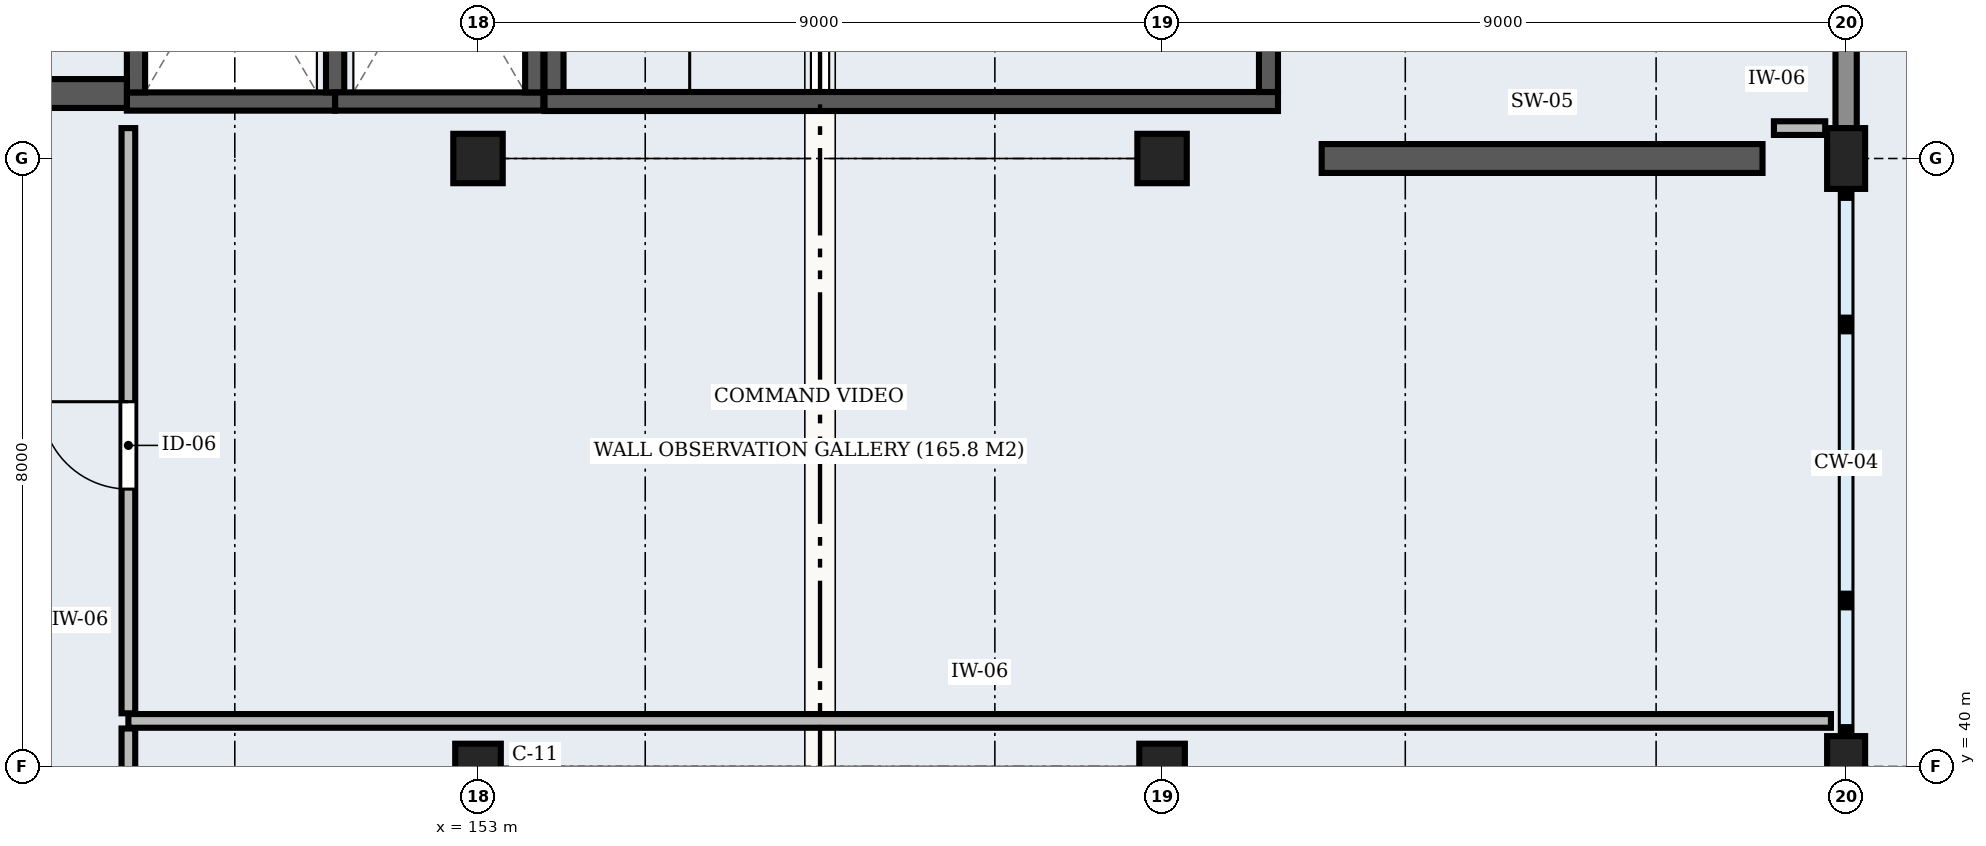
"""IFC4 building model, lengths in metres.
Left out: names, types, materials, properties, quantities, classifications, styles, units other than length and angle.
Written with IfcOpenShell. Run it as: python <this file> out.ifc"""

import sys

from ifc_helpers import new_model, si_unit, direction, frame, frame_2d, origin, origin_2d, place, context, subcontext, project, spatial, rectangle, extrude, element, fill, save


model = new_model("IFC4")
c1 = context("Model", 3, precision=1e-05, world=origin(), true_north=direction((0.0, 1.0)))
c2 = subcontext(c1, "Body", "Model", "MODEL_VIEW")
j1 = project(units=[si_unit("LENGTHUNIT", "METRE"), si_unit("PLANEANGLEUNIT", "RADIAN")], contexts=[c1])
p1 = place(None, origin())
s1 = spatial("IfcSite", under=j1, at=p1, CompositionType="ELEMENT")
p2 = place(p1, origin())
s2 = spatial("IfcBuilding", under=s1, at=p2, CompositionType="ELEMENT")
p3 = place(p2, frame((0.0, 0.0, 22.8)))
s3 = spatial("IfcBuildingStorey", under=s2, at=p3, CompositionType="ELEMENT", Elevation=22.8)
p4 = place(p3, frame((153.0, 40.0, 0.0), z_axis=(0.0, 0.0, 1.0), x_axis=(1.0, 0.0, 0.0)))
e1 = element("IfcColumn", 1, at=p4, inside=s3, PredefinedType="COLUMN", context=c2, shape_type="SweptSolid", body=[
    extrude(rectangle(XDim=0.6, YDim=0.6, at=origin_2d()), origin(), (0.0, 0.0, 1.0), 6.58),
])
p5 = place(p3, frame((153.0, 48.0, 0.0), z_axis=(0.0, 0.0, 1.0), x_axis=(1.0, 0.0, 0.0)))
e2 = element("IfcColumn", 2, at=p5, inside=s3, PredefinedType="COLUMN", context=c2, shape_type="SweptSolid", body=[
    extrude(rectangle(XDim=0.65, YDim=0.65, at=origin_2d()), origin(), (0.0, 0.0, 1.0), 6.58),
])
p6 = place(p3, frame((162.0, 40.0, 0.0), z_axis=(0.0, 0.0, 1.0), x_axis=(1.0, 0.0, 0.0)))
e3 = element("IfcColumn", 3, at=p6, inside=s3, PredefinedType="COLUMN", context=c2, shape_type="SweptSolid", body=[
    extrude(rectangle(XDim=0.6, YDim=0.6, at=origin_2d()), origin(), (0.0, 0.0, 1.0), 6.58),
])
p7 = place(p3, frame((162.0, 48.0, 0.0), z_axis=(0.0, 0.0, 1.0), x_axis=(1.0, 0.0, 0.0)))
e4 = element("IfcColumn", 4, at=p7, inside=s3, PredefinedType="COLUMN", context=c2, shape_type="SweptSolid", body=[
    extrude(rectangle(XDim=0.65, YDim=0.65, at=origin_2d()), origin(), (0.0, 0.0, 1.0), 6.58),
])
for number, where, z_axis, x_axis in (
    (5, (171.0, 40.0, 0.0), (0.0, 0.0, 1.0), (1.0, 0.0, 0.0)),
    (6, (171.0, 48.0, 0.0), (0.0, 0.0, 1.0), (1.0, 0.0, 0.0)),
):
    element("IfcColumn", number, at=place(p3, frame(where, z_axis=z_axis, x_axis=x_axis)), inside=s3, PredefinedType="COLUMN", context=c2, shape_type="SweptSolid", body=[
        extrude(rectangle(XDim=0.5, YDim=0.8, at=origin_2d()), origin(), (0.0, 0.0, 1.0), 4.2),
    ])
p8 = place(p3, frame((171.0, 55.602, 0.0), z_axis=(0.0, 0.0, 1.0), x_axis=(0.0, -1.0, 0.0)))
e7 = element("IfcWall", 7, at=p8, inside=s3, PredefinedType="STANDARD", context=c2, shape_type="SweptSolid", body=[
    extrude(rectangle(XDim=7.204, YDim=0.28, at=frame_2d((3.602, 0.0))), origin(), (0.0, 0.0, 1.0), 3.37),
])
p9 = place(p8, frame((1.027, 0.0, 0.9)))
e8 = element("IfcOpeningElement", 8, at=p9, cuts=e7, PredefinedType="OPENING", context=c2, shape_type="SweptSolid", body=[
    extrude(rectangle(XDim=0.9, YDim=2.2, at=frame_2d((0.45, 1.1))), frame((0.0, 0.152, 0.0), z_axis=(0.0, -1.0, 0.0), x_axis=(1.0, 0.0, 0.0)), (0.0, 0.0, 1.0), 0.304),
])
p10 = place(p8, frame((4.503, 0.0, 0.9)))
e9 = element("IfcOpeningElement", 9, at=p10, cuts=e7, PredefinedType="OPENING", context=c2, shape_type="SweptSolid", body=[
    extrude(rectangle(XDim=0.9, YDim=2.2, at=frame_2d((0.45, 1.1))), frame((0.0, 0.152, 0.0), z_axis=(0.0, -1.0, 0.0), x_axis=(1.0, 0.0, 0.0)), (0.0, 0.0, 1.0), 0.304),
])
p11 = place(p3, frame((153.875, 48.75, 0.0), z_axis=(0.0, 0.0, 1.0), x_axis=(1.0, 0.0, 0.0)))
e10 = element("IfcWall", 10, at=p11, inside=s3, PredefinedType="SHEAR", context=c2, shape_type="SweptSolid", body=[
    extrude(rectangle(XDim=9.65, YDim=0.25, at=frame_2d((4.825, 0.0))), origin(), (0.0, 0.0, 1.0), 3.89),
])
for number, where, z_axis, x_axis in (
    (11, (154.0, 52.725, 0.0), (0.0, 0.0, 1.0), (0.0, -1.0, 0.0)),
    (12, (163.4, 48.875, 0.0), (0.0, 0.0, 1.0), (0.0, 1.0, 0.0)),
):
    element("IfcWall", number, at=place(p3, frame(where, z_axis=z_axis, x_axis=x_axis)), inside=s3, PredefinedType="SHEAR", context=c2, shape_type="SweptSolid", body=[
        extrude(rectangle(XDim=3.85, YDim=0.25, at=frame_2d((1.925, 0.0))), origin(), (0.0, 0.0, 1.0), 3.89),
    ])
p12 = place(p3, frame((148.38, 48.75, 0.0), z_axis=(0.0, 0.0, 1.0), x_axis=(1.0, 0.0, 0.0)))
e13 = element("IfcWall", 13, at=p12, inside=s3, PredefinedType="SHEAR", context=c2, shape_type="SweptSolid", body=[
    extrude(rectangle(XDim=2.74, YDim=0.24, at=frame_2d((1.37, 0.0))), origin(), (0.0, 0.0, 1.0), 3.89),
])
for number, where, z_axis, x_axis in (
    (14, (148.5, 52.73, 0.0), (0.0, 0.0, 1.0), (0.0, -1.0, 0.0)),
    (15, (151.12, 48.87, 0.0), (0.0, 0.0, 1.0), (0.0, 1.0, 0.0)),
):
    element("IfcWall", number, at=place(p3, frame(where, z_axis=z_axis, x_axis=x_axis)), inside=s3, PredefinedType="SHEAR", context=c2, shape_type="SweptSolid", body=[
        extrude(rectangle(XDim=3.86, YDim=0.24, at=frame_2d((1.93, 0.0))), origin(), (0.0, 0.0, 1.0), 3.89),
    ])
p13 = place(p3, frame((151.12, 48.75, 0.0), z_axis=(0.0, 0.0, 1.0), x_axis=(1.0, 0.0, 0.0)))
e16 = element("IfcWall", 16, at=p13, inside=s3, PredefinedType="SHEAR", context=c2, shape_type="SweptSolid", body=[
    extrude(rectangle(XDim=2.74, YDim=0.24, at=frame_2d((1.37, 0.0))), origin(), (0.0, 0.0, 1.0), 3.89),
])
p14 = place(p3, frame((153.74, 48.87, 0.0), z_axis=(0.0, 0.0, 1.0), x_axis=(0.0, 1.0, 0.0)))
e17 = element("IfcWall", 17, at=p14, inside=s3, PredefinedType="SHEAR", context=c2, shape_type="SweptSolid", body=[
    extrude(rectangle(XDim=3.86, YDim=0.24, at=frame_2d((1.93, 0.0))), origin(), (0.0, 0.0, 1.0), 3.89),
])
p15 = place(p3, frame((145.68, 48.855, 0.0), z_axis=(0.0, 0.0, 1.0), x_axis=(1.0, 0.0, 0.0)))
e18 = element("IfcWall", 18, at=p15, inside=s3, PredefinedType="SHEAR", context=c2, shape_type="SweptSolid", body=[
    extrude(rectangle(XDim=2.7, YDim=0.38, at=frame_2d((1.35, 0.0))), origin(), (0.0, 0.0, 1.0), 2.94),
])
p16 = place(p3, frame((164.1, 48.0, 0.0), z_axis=(0.0, 0.0, 1.0), x_axis=(1.0, 0.0, 0.0)))
e19 = element("IfcWall", 19, at=p16, inside=s3, PredefinedType="SHEAR", context=c2, shape_type="SweptSolid", body=[
    extrude(rectangle(XDim=5.8, YDim=0.38, at=frame_2d((2.9, 0.0))), origin(), (0.0, 0.0, 1.0), 2.94),
])
p17 = place(p3, frame((148.4, 40.6, 0.0), z_axis=(0.0, 0.0, 1.0), x_axis=(1.0, 0.0, 0.0)))
e20 = element("IfcWall", 20, at=p17, inside=s3, PredefinedType="STANDARD", context=c2, shape_type="SweptSolid", body=[
    extrude(rectangle(XDim=22.4, YDim=0.18, at=frame_2d((11.2, 0.0))), origin(), (0.0, 0.0, 1.0), 3.89),
])
p18 = place(p3, frame((148.4, 24.155, 0.0), z_axis=(0.0, 0.0, 1.0), x_axis=(0.0, 1.0, 0.0)))
e21 = element("IfcWall", 21, at=p18, inside=s3, PredefinedType="STANDARD", context=c2, shape_type="SweptSolid", body=[
    extrude(rectangle(XDim=16.345, YDim=0.18, at=frame_2d((8.172, 0.0))), origin(), (0.0, 0.0, 1.0), 3.89),
])
p19 = place(p18, frame((7.575, 0.0, 0.0)))
e22 = element("IfcOpeningElement", 22, at=p19, cuts=e21, PredefinedType="OPENING", context=c2, shape_type="SweptSolid", body=[
    extrude(rectangle(XDim=1.15, YDim=2.15, at=frame_2d((0.575, 1.075))), frame((0.0, 0.102, 0.0), z_axis=(0.0, -1.0, 0.0), x_axis=(1.0, 0.0, 0.0)), (0.0, 0.0, 1.0), 0.204),
])
p20 = place(p3, frame((170.05, 48.4, 0.0), z_axis=(0.0, 0.0, 1.0), x_axis=(1.0, 0.0, 0.0)))
e23 = element("IfcWall", 23, at=p20, inside=s3, PredefinedType="STANDARD", context=c2, shape_type="SweptSolid", body=[
    extrude(rectangle(XDim=0.675, YDim=0.18, at=frame_2d((0.337, 0.0))), origin(), (0.0, 0.0, 1.0), 3.89),
])
p21 = place(p3, frame((148.4, 40.7, 0.0), z_axis=(0.0, 0.0, 1.0), x_axis=(0.0, 1.0, 0.0)))
e24 = element("IfcWall", 24, at=p21, inside=s3, PredefinedType="STANDARD", context=c2, shape_type="SweptSolid", body=[
    extrude(rectangle(XDim=7.7, YDim=0.18, at=frame_2d((3.85, 0.0))), origin(), (0.0, 0.0, 1.0), 3.89),
])
p22 = place(p21, frame((2.95, 0.0, 0.0)))
e25 = element("IfcOpeningElement", 25, at=p22, cuts=e24, PredefinedType="OPENING", context=c2, shape_type="SweptSolid", body=[
    extrude(rectangle(XDim=1.15, YDim=2.15, at=frame_2d((0.575, 1.075))), frame((0.0, 0.102, 0.0), z_axis=(0.0, -1.0, 0.0), x_axis=(1.0, 0.0, 0.0)), (0.0, 0.0, 1.0), 0.204),
])
p23 = place(p22, origin())
e26 = element("IfcDoor", 26, at=p23, inside=s3, OperationType="SINGLE_SWING_RIGHT", PredefinedType="DOOR", context=c2, shape_type="SweptSolid", body=[
    extrude(rectangle(XDim=1.15, YDim=2.15, at=frame_2d((0.575, 1.075))), frame((0.0, 0.025, 0.0), z_axis=(0.0, -1.0, 0.0), x_axis=(1.0, 0.0, 0.0)), (0.0, 0.0, 1.0), 0.05),
])
fill(e25, e26)
save(model, sys.argv[1])
